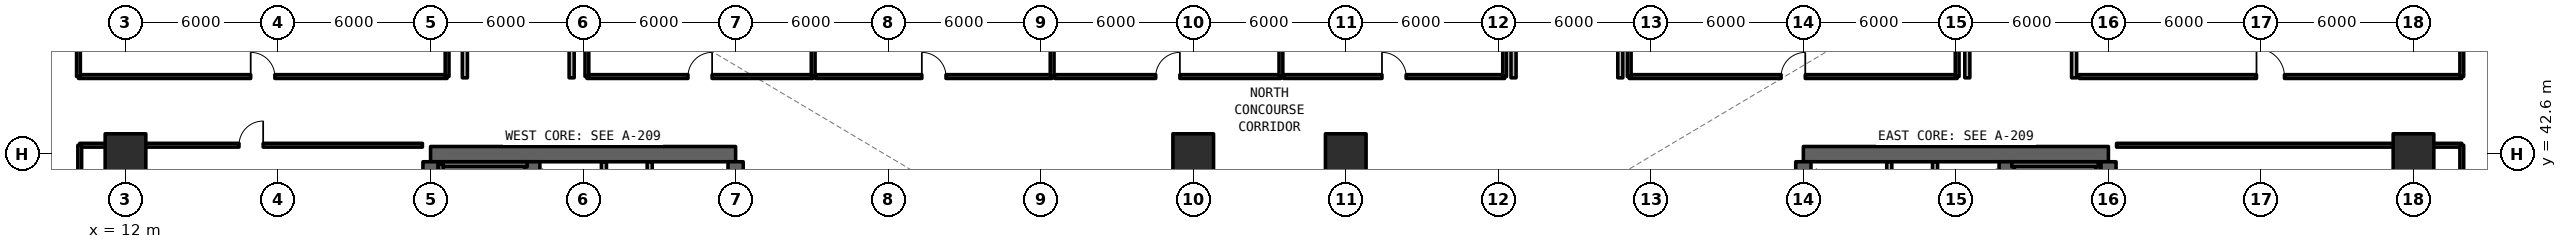
"""IFC4 building model, lengths in metres.
Left out: names, types, materials, properties, quantities, classifications, styles, units other than length and angle.
Written with IfcOpenShell. Run it as: python <this file> out.ifc"""

import sys

from ifc_helpers import new_model, si_unit, direction, frame, frame_2d, origin, origin_2d, place, context, subcontext, project, spatial, rectangle, extrude, element, fill, save


model = new_model("IFC4")
c1 = context("Model", 3, precision=1e-05, world=origin(), true_north=direction((0.0, 1.0)))
c2 = subcontext(c1, "Body", "Model", "MODEL_VIEW")
j1 = project(units=[si_unit("LENGTHUNIT", "METRE"), si_unit("PLANEANGLEUNIT", "RADIAN")], contexts=[c1])
p1 = place(None, origin())
s1 = spatial("IfcSite", under=j1, at=p1, CompositionType="ELEMENT")
p2 = place(p1, origin())
s2 = spatial("IfcBuilding", under=s1, at=p2, CompositionType="ELEMENT")
p3 = place(p2, frame((0.0, 0.0, 19.47)))
s3 = spatial("IfcBuildingStorey", under=s2, at=p3, CompositionType="ELEMENT", Elevation=19.47)
p4 = place(p3, frame((36.0, 42.6, 0.0), z_axis=(0.0, 0.0, 1.0), x_axis=(-1.0, 0.0, 0.0)))
e1 = element("IfcWall", 1, at=p4, inside=s3, PredefinedType="SHEAR", context=c2, shape_type="SweptSolid", body=[
    extrude(rectangle(XDim=12.0, YDim=0.6, at=frame_2d((6.0, 0.0))), origin(), (0.0, 0.0, 1.0), 4.62),
])
p5 = place(p3, frame((24.0, 24.9, 0.0), z_axis=(0.0, 0.0, 1.0), x_axis=(0.0, 1.0, 0.0)))
e2 = element("IfcWall", 2, at=p5, inside=s3, PredefinedType="SHEAR", context=c2, shape_type="SweptSolid", body=[
    extrude(rectangle(XDim=17.4, YDim=0.6, at=frame_2d((8.7, 0.0))), origin(), (0.0, 0.0, 1.0), 4.62),
])
p6 = place(p3, frame((36.0, 36.8, 0.0), z_axis=(0.0, 0.0, 1.0), x_axis=(0.0, 1.0, 0.0)))
e3 = element("IfcWall", 3, at=p6, inside=s3, PredefinedType="SHEAR", context=c2, shape_type="SweptSolid", body=[
    extrude(rectangle(XDim=5.5, YDim=0.6, at=frame_2d((2.75, 0.0))), origin(), (0.0, 0.0, 1.0), 4.62),
])
p7 = place(p3, frame((28.0, 24.9, 0.0), z_axis=(0.0, 0.0, 1.0), x_axis=(0.0, 1.0, 0.0)))
e4 = element("IfcWall", 4, at=p7, inside=s3, PredefinedType="SHEAR", context=c2, shape_type="SweptSolid", body=[
    extrude(rectangle(XDim=17.4, YDim=0.6, at=frame_2d((8.7, 0.0))), origin(), (0.0, 0.0, 1.0), 4.62),
])
p8 = place(p7, frame((0.35, 0.0, 0.0)))
e5 = element("IfcOpeningElement", 5, at=p8, cuts=e4, PredefinedType="OPENING", context=c2, shape_type="SweptSolid", body=[
    extrude(rectangle(XDim=1.15, YDim=2.15, at=frame_2d((0.575, 1.075))), frame((0.0, 0.31, 0.0), z_axis=(0.0, -1.0, 0.0), x_axis=(1.0, 0.0, 0.0)), (0.0, 0.0, 1.0), 0.62),
])
p9 = place(p7, frame((9.55, 0.0, 0.0)))
e6 = element("IfcOpeningElement", 6, at=p9, cuts=e4, PredefinedType="OPENING", context=c2, shape_type="SweptSolid", body=[
    extrude(rectangle(XDim=1.15, YDim=2.15, at=frame_2d((0.575, 1.075))), frame((0.0, 0.31, 0.0), z_axis=(0.0, -1.0, 0.0), x_axis=(1.0, 0.0, 0.0)), (0.0, 0.0, 1.0), 0.62),
])
p10 = place(p3, frame((90.0, 42.6, 0.0), z_axis=(0.0, 0.0, 1.0), x_axis=(-1.0, 0.0, 0.0)))
e7 = element("IfcWall", 7, at=p10, inside=s3, PredefinedType="SHEAR", context=c2, shape_type="SweptSolid", body=[
    extrude(rectangle(XDim=12.0, YDim=0.6, at=frame_2d((6.0, 0.0))), origin(), (0.0, 0.0, 1.0), 4.62),
])
p11 = place(p3, frame((90.0, 24.9, 0.0), z_axis=(0.0, 0.0, 1.0), x_axis=(0.0, 1.0, 0.0)))
e8 = element("IfcWall", 8, at=p11, inside=s3, PredefinedType="SHEAR", context=c2, shape_type="SweptSolid", body=[
    extrude(rectangle(XDim=17.4, YDim=0.6, at=frame_2d((8.7, 0.0))), origin(), (0.0, 0.0, 1.0), 4.62),
])
p12 = place(p3, frame((78.0, 36.8, 0.0), z_axis=(0.0, 0.0, 1.0), x_axis=(0.0, 1.0, 0.0)))
e9 = element("IfcWall", 9, at=p12, inside=s3, PredefinedType="SHEAR", context=c2, shape_type="SweptSolid", body=[
    extrude(rectangle(XDim=5.5, YDim=0.6, at=frame_2d((2.75, 0.0))), origin(), (0.0, 0.0, 1.0), 4.62),
])
p13 = place(p3, frame((86.0, 24.9, 0.0), z_axis=(0.0, 0.0, 1.0), x_axis=(0.0, 1.0, 0.0)))
e10 = element("IfcWall", 10, at=p13, inside=s3, PredefinedType="SHEAR", context=c2, shape_type="SweptSolid", body=[
    extrude(rectangle(XDim=17.4, YDim=0.6, at=frame_2d((8.7, 0.0))), origin(), (0.0, 0.0, 1.0), 4.62),
])
p14 = place(p13, frame((0.35, 0.0, 0.0)))
e11 = element("IfcOpeningElement", 11, at=p14, cuts=e10, PredefinedType="OPENING", context=c2, shape_type="SweptSolid", body=[
    extrude(rectangle(XDim=1.15, YDim=2.15, at=frame_2d((0.575, 1.075))), frame((0.0, 0.31, 0.0), z_axis=(0.0, -1.0, 0.0), x_axis=(1.0, 0.0, 0.0)), (0.0, 0.0, 1.0), 0.62),
])
p15 = place(p13, frame((9.55, 0.0, 0.0)))
e12 = element("IfcOpeningElement", 12, at=p15, cuts=e10, PredefinedType="OPENING", context=c2, shape_type="SweptSolid", body=[
    extrude(rectangle(XDim=1.15, YDim=2.15, at=frame_2d((0.575, 1.075))), frame((0.0, 0.31, 0.0), z_axis=(0.0, -1.0, 0.0), x_axis=(1.0, 0.0, 0.0)), (0.0, 0.0, 1.0), 0.62),
])
for number, where, z_axis, x_axis in (
    (13, (12.0, 42.6, 0.0), (0.0, 0.0, 1.0), (1.0, 0.0, 0.0)),
    (14, (54.0, 42.6, 0.0), (0.0, 0.0, 1.0), (1.0, 0.0, 0.0)),
    (15, (60.0, 42.6, 0.0), (0.0, 0.0, 1.0), (1.0, 0.0, 0.0)),
    (16, (102.0, 42.6, 0.0), (0.0, 0.0, 1.0), (1.0, 0.0, 0.0)),
):
    element("IfcColumn", number, at=place(p3, frame(where, z_axis=z_axis, x_axis=x_axis)), inside=s3, PredefinedType="COLUMN", context=c2, shape_type="SweptSolid", body=[
        extrude(rectangle(XDim=1.6, YDim=1.6, at=origin_2d()), origin(), (0.0, 0.0, 1.0), 4.62),
    ])
for number, where, z_axis, x_axis in (
    (17, (30.82, 36.88, 0.0), (0.0, 0.0, 1.0), (0.0, 1.0, 0.0)),
    (18, (32.62, 36.88, 0.0), (0.0, 0.0, 1.0), (0.0, 1.0, 0.0)),
    (19, (83.18, 36.88, 0.0), (0.0, 0.0, 1.0), (0.0, 1.0, 0.0)),
    (20, (81.38, 36.88, 0.0), (0.0, 0.0, 1.0), (0.0, 1.0, 0.0)),
):
    element("IfcWall", number, at=place(p3, frame(where, z_axis=z_axis, x_axis=x_axis)), inside=s3, PredefinedType="SOLIDWALL", context=c2, shape_type="SweptSolid", body=[
        extrude(rectangle(XDim=5.42, YDim=0.2, at=frame_2d((2.71, 0.0))), origin(), (0.0, 0.0, 1.0), 3.49),
    ])
for number, where, z_axis, x_axis in (
    (21, (25.35, 45.6, 0.0), (0.0, 0.0, 1.0), (0.0, 1.0, 0.0)),
    (22, (29.55, 45.6, 0.0), (0.0, 0.0, 1.0), (0.0, 1.0, 0.0)),
    (23, (66.6, 45.6, 0.0), (0.0, 0.0, 1.0), (0.0, 1.0, 0.0)),
    (24, (70.8, 45.6, 0.0), (0.0, 0.0, 1.0), (0.0, 1.0, 0.0)),
    (25, (84.45, 45.6, 0.0), (0.0, 0.0, 1.0), (0.0, 1.0, 0.0)),
    (26, (88.65, 45.6, 0.0), (0.0, 0.0, 1.0), (0.0, 1.0, 0.0)),
):
    element("IfcWall", number, at=place(p3, frame(where, z_axis=z_axis, x_axis=x_axis)), inside=s3, PredefinedType="SOLIDWALL", context=c2, shape_type="SweptSolid", body=[
        extrude(rectangle(XDim=4.6, YDim=0.2, at=frame_2d((2.3, 0.0))), origin(), (0.0, 0.0, 1.0), 3.49),
    ])
p16 = place(p3, frame((10.15, 45.65, 0.0), z_axis=(0.0, 0.0, 1.0), x_axis=(1.0, 0.0, 0.0)))
e27 = element("IfcWall", 27, at=p16, inside=s3, PredefinedType="SOLIDWALL", context=c2, shape_type="SweptSolid", body=[
    extrude(rectangle(XDim=14.5, YDim=0.15, at=frame_2d((7.25, 0.0))), origin(), (0.0, 0.0, 1.0), 3.49),
])
p17 = place(p16, frame((6.775, 0.0, 0.0)))
e28 = element("IfcOpeningElement", 28, at=p17, cuts=e27, PredefinedType="OPENING", context=c2, shape_type="SweptSolid", body=[
    extrude(rectangle(XDim=0.95, YDim=2.15, at=frame_2d((0.475, 1.075))), frame((0.0, 0.085, 0.0), z_axis=(0.0, -1.0, 0.0), x_axis=(1.0, 0.0, 0.0)), (0.0, 0.0, 1.0), 0.17),
])
for number, where, z_axis, x_axis in (
    (29, (10.15, 45.65, 0.0), (0.0, 0.0, 1.0), (0.0, 1.0, 0.0)),
    (30, (24.65, 45.65, 0.0), (0.0, 0.0, 1.0), (0.0, 1.0, 0.0)),
):
    element("IfcWall", number, at=place(p3, frame(where, z_axis=z_axis, x_axis=x_axis)), inside=s3, PredefinedType="SOLIDWALL", context=c2, shape_type="SweptSolid", body=[
        extrude(rectangle(XDim=17.27, YDim=0.15, at=frame_2d((8.635, 0.0))), origin(), (0.0, 0.0, 1.0), 3.49),
    ])
p18 = place(p3, frame((30.15, 45.65, 0.0), z_axis=(0.0, 0.0, 1.0), x_axis=(1.0, 0.0, 0.0)))
e31 = element("IfcWall", 31, at=p18, inside=s3, PredefinedType="SOLIDWALL", context=c2, shape_type="SweptSolid", body=[
    extrude(rectangle(XDim=8.9, YDim=0.15, at=frame_2d((4.45, 0.0))), origin(), (0.0, 0.0, 1.0), 3.49),
])
p19 = place(p18, frame((3.975, 0.0, 0.0)))
e32 = element("IfcOpeningElement", 32, at=p19, cuts=e31, PredefinedType="OPENING", context=c2, shape_type="SweptSolid", body=[
    extrude(rectangle(XDim=0.95, YDim=2.15, at=frame_2d((0.475, 1.075))), frame((0.0, 0.085, 0.0), z_axis=(0.0, -1.0, 0.0), x_axis=(1.0, 0.0, 0.0)), (0.0, 0.0, 1.0), 0.17),
])
for number, where, z_axis, x_axis in (
    (33, (30.15, 45.65, 0.0), (0.0, 0.0, 1.0), (0.0, 1.0, 0.0)),
    (34, (39.05, 45.65, 0.0), (0.0, 0.0, 1.0), (0.0, 1.0, 0.0)),
):
    element("IfcWall", number, at=place(p3, frame(where, z_axis=z_axis, x_axis=x_axis)), inside=s3, PredefinedType="SOLIDWALL", context=c2, shape_type="SweptSolid", body=[
        extrude(rectangle(XDim=17.27, YDim=0.15, at=frame_2d((8.635, 0.0))), origin(), (0.0, 0.0, 1.0), 3.49),
    ])
p20 = place(p3, frame((39.15, 45.65, 0.0), z_axis=(0.0, 0.0, 1.0), x_axis=(1.0, 0.0, 0.0)))
e35 = element("IfcWall", 35, at=p20, inside=s3, PredefinedType="SOLIDWALL", context=c2, shape_type="SweptSolid", body=[
    extrude(rectangle(XDim=9.3, YDim=0.15, at=frame_2d((4.65, 0.0))), origin(), (0.0, 0.0, 1.0), 3.49),
])
p21 = place(p20, frame((4.175, 0.0, 0.0)))
e36 = element("IfcOpeningElement", 36, at=p21, cuts=e35, PredefinedType="OPENING", context=c2, shape_type="SweptSolid", body=[
    extrude(rectangle(XDim=0.95, YDim=2.15, at=frame_2d((0.475, 1.075))), frame((0.0, 0.085, 0.0), z_axis=(0.0, -1.0, 0.0), x_axis=(1.0, 0.0, 0.0)), (0.0, 0.0, 1.0), 0.17),
])
p22 = place(p3, frame((48.45, 45.65, 0.0), z_axis=(0.0, 0.0, 1.0), x_axis=(0.0, 1.0, 0.0)))
e37 = element("IfcWall", 37, at=p22, inside=s3, PredefinedType="SOLIDWALL", context=c2, shape_type="SweptSolid", body=[
    extrude(rectangle(XDim=17.27, YDim=0.15, at=frame_2d((8.635, 0.0))), origin(), (0.0, 0.0, 1.0), 3.49),
])
p23 = place(p3, frame((48.55, 45.65, 0.0), z_axis=(0.0, 0.0, 1.0), x_axis=(1.0, 0.0, 0.0)))
e38 = element("IfcWall", 38, at=p23, inside=s3, PredefinedType="SOLIDWALL", context=c2, shape_type="SweptSolid", body=[
    extrude(rectangle(XDim=8.9, YDim=0.15, at=frame_2d((4.45, 0.0))), origin(), (0.0, 0.0, 1.0), 3.49),
])
p24 = place(p23, frame((3.975, 0.0, 0.0)))
e39 = element("IfcOpeningElement", 39, at=p24, cuts=e38, PredefinedType="OPENING", context=c2, shape_type="SweptSolid", body=[
    extrude(rectangle(XDim=0.95, YDim=2.15, at=frame_2d((0.475, 1.075))), frame((0.0, 0.085, 0.0), z_axis=(0.0, -1.0, 0.0), x_axis=(1.0, 0.0, 0.0)), (0.0, 0.0, 1.0), 0.17),
])
p25 = place(p3, frame((57.45, 45.65, 0.0), z_axis=(0.0, 0.0, 1.0), x_axis=(0.0, 1.0, 0.0)))
e40 = element("IfcWall", 40, at=p25, inside=s3, PredefinedType="SOLIDWALL", context=c2, shape_type="SweptSolid", body=[
    extrude(rectangle(XDim=17.27, YDim=0.15, at=frame_2d((8.635, 0.0))), origin(), (0.0, 0.0, 1.0), 3.49),
])
p26 = place(p3, frame((57.55, 45.65, 0.0), z_axis=(0.0, 0.0, 1.0), x_axis=(1.0, 0.0, 0.0)))
e41 = element("IfcWall", 41, at=p26, inside=s3, PredefinedType="SOLIDWALL", context=c2, shape_type="SweptSolid", body=[
    extrude(rectangle(XDim=8.7, YDim=0.15, at=frame_2d((4.35, 0.0))), origin(), (0.0, 0.0, 1.0), 3.49),
])
p27 = place(p26, frame((3.875, 0.0, 0.0)))
e42 = element("IfcOpeningElement", 42, at=p27, cuts=e41, PredefinedType="OPENING", context=c2, shape_type="SweptSolid", body=[
    extrude(rectangle(XDim=0.95, YDim=2.15, at=frame_2d((0.475, 1.075))), frame((0.0, 0.085, 0.0), z_axis=(0.0, -1.0, 0.0), x_axis=(1.0, 0.0, 0.0)), (0.0, 0.0, 1.0), 0.17),
])
p28 = place(p3, frame((66.25, 45.65, 0.0), z_axis=(0.0, 0.0, 1.0), x_axis=(0.0, 1.0, 0.0)))
e43 = element("IfcWall", 43, at=p28, inside=s3, PredefinedType="SOLIDWALL", context=c2, shape_type="SweptSolid", body=[
    extrude(rectangle(XDim=17.27, YDim=0.15, at=frame_2d((8.635, 0.0))), origin(), (0.0, 0.0, 1.0), 3.49),
])
p29 = place(p3, frame((71.15, 45.65, 0.0), z_axis=(0.0, 0.0, 1.0), x_axis=(1.0, 0.0, 0.0)))
e44 = element("IfcWall", 44, at=p29, inside=s3, PredefinedType="SOLIDWALL", context=c2, shape_type="SweptSolid", body=[
    extrude(rectangle(XDim=12.9, YDim=0.15, at=frame_2d((6.45, 0.0))), origin(), (0.0, 0.0, 1.0), 3.49),
])
p30 = place(p29, frame((5.975, 0.0, 0.0)))
e45 = element("IfcOpeningElement", 45, at=p30, cuts=e44, PredefinedType="OPENING", context=c2, shape_type="SweptSolid", body=[
    extrude(rectangle(XDim=0.95, YDim=2.15, at=frame_2d((0.475, 1.075))), frame((0.0, 0.085, 0.0), z_axis=(0.0, -1.0, 0.0), x_axis=(1.0, 0.0, 0.0)), (0.0, 0.0, 1.0), 0.17),
])
for number, where, z_axis, x_axis in (
    (46, (71.15, 45.65, 0.0), (0.0, 0.0, 1.0), (0.0, 1.0, 0.0)),
    (47, (84.05, 45.65, 0.0), (0.0, 0.0, 1.0), (0.0, 1.0, 0.0)),
):
    element("IfcWall", number, at=place(p3, frame(where, z_axis=z_axis, x_axis=x_axis)), inside=s3, PredefinedType="SOLIDWALL", context=c2, shape_type="SweptSolid", body=[
        extrude(rectangle(XDim=17.27, YDim=0.15, at=frame_2d((8.635, 0.0))), origin(), (0.0, 0.0, 1.0), 3.49),
    ])
p31 = place(p3, frame((10.2, 42.95, 0.0), z_axis=(0.0, 0.0, 1.0), x_axis=(1.0, 0.0, 0.0)))
e48 = element("IfcWall", 48, at=p31, inside=s3, PredefinedType="SOLIDWALL", context=c2, shape_type="SweptSolid", body=[
    extrude(rectangle(XDim=13.48, YDim=0.15, at=frame_2d((6.74, 0.0))), origin(), (0.0, 0.0, 1.0), 3.49),
])
p32 = place(p31, frame((6.265, 0.0, 0.0)))
e49 = element("IfcOpeningElement", 49, at=p32, cuts=e48, PredefinedType="OPENING", context=c2, shape_type="SweptSolid", body=[
    extrude(rectangle(XDim=0.95, YDim=2.15, at=frame_2d((0.475, 1.075))), frame((0.0, 0.085, 0.0), z_axis=(0.0, -1.0, 0.0), x_axis=(1.0, 0.0, 0.0)), (0.0, 0.0, 1.0), 0.17),
])
p33 = place(p3, frame((10.2, 33.4, 0.0), z_axis=(0.0, 0.0, 1.0), x_axis=(0.0, 1.0, 0.0)))
e50 = element("IfcWall", 50, at=p33, inside=s3, PredefinedType="SOLIDWALL", context=c2, shape_type="SweptSolid", body=[
    extrude(rectangle(XDim=9.55, YDim=0.15, at=frame_2d((4.775, 0.0))), origin(), (0.0, 0.0, 1.0), 3.49),
])
p34 = place(p3, frame((90.32, 42.95, 0.0), z_axis=(0.0, 0.0, 1.0), x_axis=(1.0, 0.0, 0.0)))
e51 = element("IfcWall", 51, at=p34, inside=s3, PredefinedType="SOLIDWALL", context=c2, shape_type="SweptSolid", body=[
    extrude(rectangle(XDim=13.58, YDim=0.15, at=frame_2d((6.79, 0.0))), origin(), (0.0, 0.0, 1.0), 3.49),
])
p35 = place(p3, frame((103.9, 24.25, 0.0), z_axis=(0.0, 0.0, 1.0), x_axis=(0.0, 1.0, 0.0)))
e52 = element("IfcWall", 52, at=p35, inside=s3, PredefinedType="SOLIDWALL", context=c2, shape_type="SweptSolid", body=[
    extrude(rectangle(XDim=18.7, YDim=0.15, at=frame_2d((9.35, 0.0))), origin(), (0.0, 0.0, 1.0), 3.49),
])
p36 = place(p3, frame((88.85, 45.65, 0.0), z_axis=(0.0, 0.0, 1.0), x_axis=(1.0, 0.0, 0.0)))
e53 = element("IfcWall", 53, at=p36, inside=s3, PredefinedType="SOLIDWALL", context=c2, shape_type="SweptSolid", body=[
    extrude(rectangle(XDim=15.05, YDim=0.15, at=frame_2d((7.525, 0.0))), origin(), (0.0, 0.0, 1.0), 3.49),
])
p37 = place(p36, frame((6.975, 0.0, 0.0)))
e54 = element("IfcOpeningElement", 54, at=p37, cuts=e53, PredefinedType="OPENING", context=c2, shape_type="SweptSolid", body=[
    extrude(rectangle(XDim=1.1, YDim=2.15, at=frame_2d((0.55, 1.075))), frame((0.0, 0.085, 0.0), z_axis=(0.0, -1.0, 0.0), x_axis=(1.0, 0.0, 0.0)), (0.0, 0.0, 1.0), 0.17),
])
p38 = place(p3, frame((103.9, 45.65, 0.0), z_axis=(0.0, 0.0, 1.0), x_axis=(0.0, 1.0, 0.0)))
e55 = element("IfcWall", 55, at=p38, inside=s3, PredefinedType="SOLIDWALL", context=c2, shape_type="SweptSolid", body=[
    extrude(rectangle(XDim=17.27, YDim=0.15, at=frame_2d((8.635, 0.0))), origin(), (0.0, 0.0, 1.0), 3.49),
])
p39 = place(p3, frame((27.8, 42.2, 0.0), z_axis=(0.0, 0.0, 1.0), x_axis=(-1.0, 0.0, 0.0)))
e56 = element("IfcWall", 56, at=p39, inside=s3, PredefinedType="SOLIDWALL", context=c2, shape_type="SweptSolid", body=[
    extrude(rectangle(XDim=3.4, YDim=0.2, at=frame_2d((1.7, 0.0))), origin(), (0.0, 0.0, 1.0), 4.62),
])
for number, where, z_axis, x_axis in (
    (57, (24.4, 42.2, 0.0), (0.0, 0.0, 1.0), (0.0, -1.0, 0.0)),
    (58, (89.6, 34.2, 0.0), (0.0, 0.0, 1.0), (0.0, 1.0, 0.0)),
):
    element("IfcWall", number, at=place(p3, frame(where, z_axis=z_axis, x_axis=x_axis)), inside=s3, PredefinedType="SOLIDWALL", context=c2, shape_type="SweptSolid", body=[
        extrude(rectangle(XDim=8.0, YDim=0.2, at=frame_2d((4.0, 0.0))), origin(), (0.0, 0.0, 1.0), 4.62),
    ])
p40 = place(p3, frame((89.6, 42.2, 0.0), z_axis=(0.0, 0.0, 1.0), x_axis=(-1.0, 0.0, 0.0)))
e59 = element("IfcWall", 59, at=p40, inside=s3, PredefinedType="SOLIDWALL", context=c2, shape_type="SweptSolid", body=[
    extrude(rectangle(XDim=3.4, YDim=0.2, at=frame_2d((1.7, 0.0))), origin(), (0.0, 0.0, 1.0), 4.62),
])
p41 = place(p17, origin())
e60 = element("IfcDoor", 60, at=p41, inside=s3, OperationType="SINGLE_SWING_LEFT", PredefinedType="DOOR", context=c2, shape_type="SweptSolid", body=[
    extrude(rectangle(XDim=0.95, YDim=2.15, at=frame_2d((0.475, 1.075))), frame((0.0, 0.025, 0.0), z_axis=(0.0, -1.0, 0.0), x_axis=(1.0, 0.0, 0.0)), (0.0, 0.0, 1.0), 0.05),
])
fill(e28, e60)
p42 = place(p19, origin())
e61 = element("IfcDoor", 61, at=p42, inside=s3, OperationType="SINGLE_SWING_RIGHT", PredefinedType="DOOR", context=c2, shape_type="SweptSolid", body=[
    extrude(rectangle(XDim=0.95, YDim=2.15, at=frame_2d((0.475, 1.075))), frame((0.0, 0.025, 0.0), z_axis=(0.0, -1.0, 0.0), x_axis=(1.0, 0.0, 0.0)), (0.0, 0.0, 1.0), 0.05),
])
fill(e32, e61)
p43 = place(p21, origin())
e62 = element("IfcDoor", 62, at=p43, inside=s3, OperationType="SINGLE_SWING_LEFT", PredefinedType="DOOR", context=c2, shape_type="SweptSolid", body=[
    extrude(rectangle(XDim=0.95, YDim=2.15, at=frame_2d((0.475, 1.075))), frame((0.0, 0.025, 0.0), z_axis=(0.0, -1.0, 0.0), x_axis=(1.0, 0.0, 0.0)), (0.0, 0.0, 1.0), 0.05),
])
fill(e36, e62)
p44 = place(p24, origin())
e63 = element("IfcDoor", 63, at=p44, inside=s3, OperationType="SINGLE_SWING_RIGHT", PredefinedType="DOOR", context=c2, shape_type="SweptSolid", body=[
    extrude(rectangle(XDim=0.95, YDim=2.15, at=frame_2d((0.475, 1.075))), frame((0.0, 0.025, 0.0), z_axis=(0.0, -1.0, 0.0), x_axis=(1.0, 0.0, 0.0)), (0.0, 0.0, 1.0), 0.05),
])
fill(e39, e63)
p45 = place(p27, origin())
e64 = element("IfcDoor", 64, at=p45, inside=s3, OperationType="SINGLE_SWING_LEFT", PredefinedType="DOOR", context=c2, shape_type="SweptSolid", body=[
    extrude(rectangle(XDim=0.95, YDim=2.15, at=frame_2d((0.475, 1.075))), frame((0.0, 0.025, 0.0), z_axis=(0.0, -1.0, 0.0), x_axis=(1.0, 0.0, 0.0)), (0.0, 0.0, 1.0), 0.05),
])
fill(e42, e64)
p46 = place(p30, origin())
e65 = element("IfcDoor", 65, at=p46, inside=s3, OperationType="SINGLE_SWING_RIGHT", PredefinedType="DOOR", context=c2, shape_type="SweptSolid", body=[
    extrude(rectangle(XDim=0.95, YDim=2.15, at=frame_2d((0.475, 1.075))), frame((0.0, 0.025, 0.0), z_axis=(0.0, -1.0, 0.0), x_axis=(1.0, 0.0, 0.0)), (0.0, 0.0, 1.0), 0.05),
])
fill(e45, e65)
p47 = place(p32, origin())
e66 = element("IfcDoor", 66, at=p47, inside=s3, OperationType="SINGLE_SWING_RIGHT", PredefinedType="DOOR", context=c2, shape_type="SweptSolid", body=[
    extrude(rectangle(XDim=0.95, YDim=2.15, at=frame_2d((0.475, 1.075))), frame((0.0, 0.025, 0.0), z_axis=(0.0, -1.0, 0.0), x_axis=(1.0, 0.0, 0.0)), (0.0, 0.0, 1.0), 0.05),
])
fill(e49, e66)
p48 = place(p37, origin())
e67 = element("IfcDoor", 67, at=p48, inside=s3, OperationType="SINGLE_SWING_LEFT", PredefinedType="DOOR", context=c2, shape_type="SweptSolid", body=[
    extrude(rectangle(XDim=1.1, YDim=2.15, at=frame_2d((0.55, 1.075))), frame((0.0, 0.025, 0.0), z_axis=(0.0, -1.0, 0.0), x_axis=(1.0, 0.0, 0.0)), (0.0, 0.0, 1.0), 0.05),
])
fill(e54, e67)
save(model, sys.argv[1])
